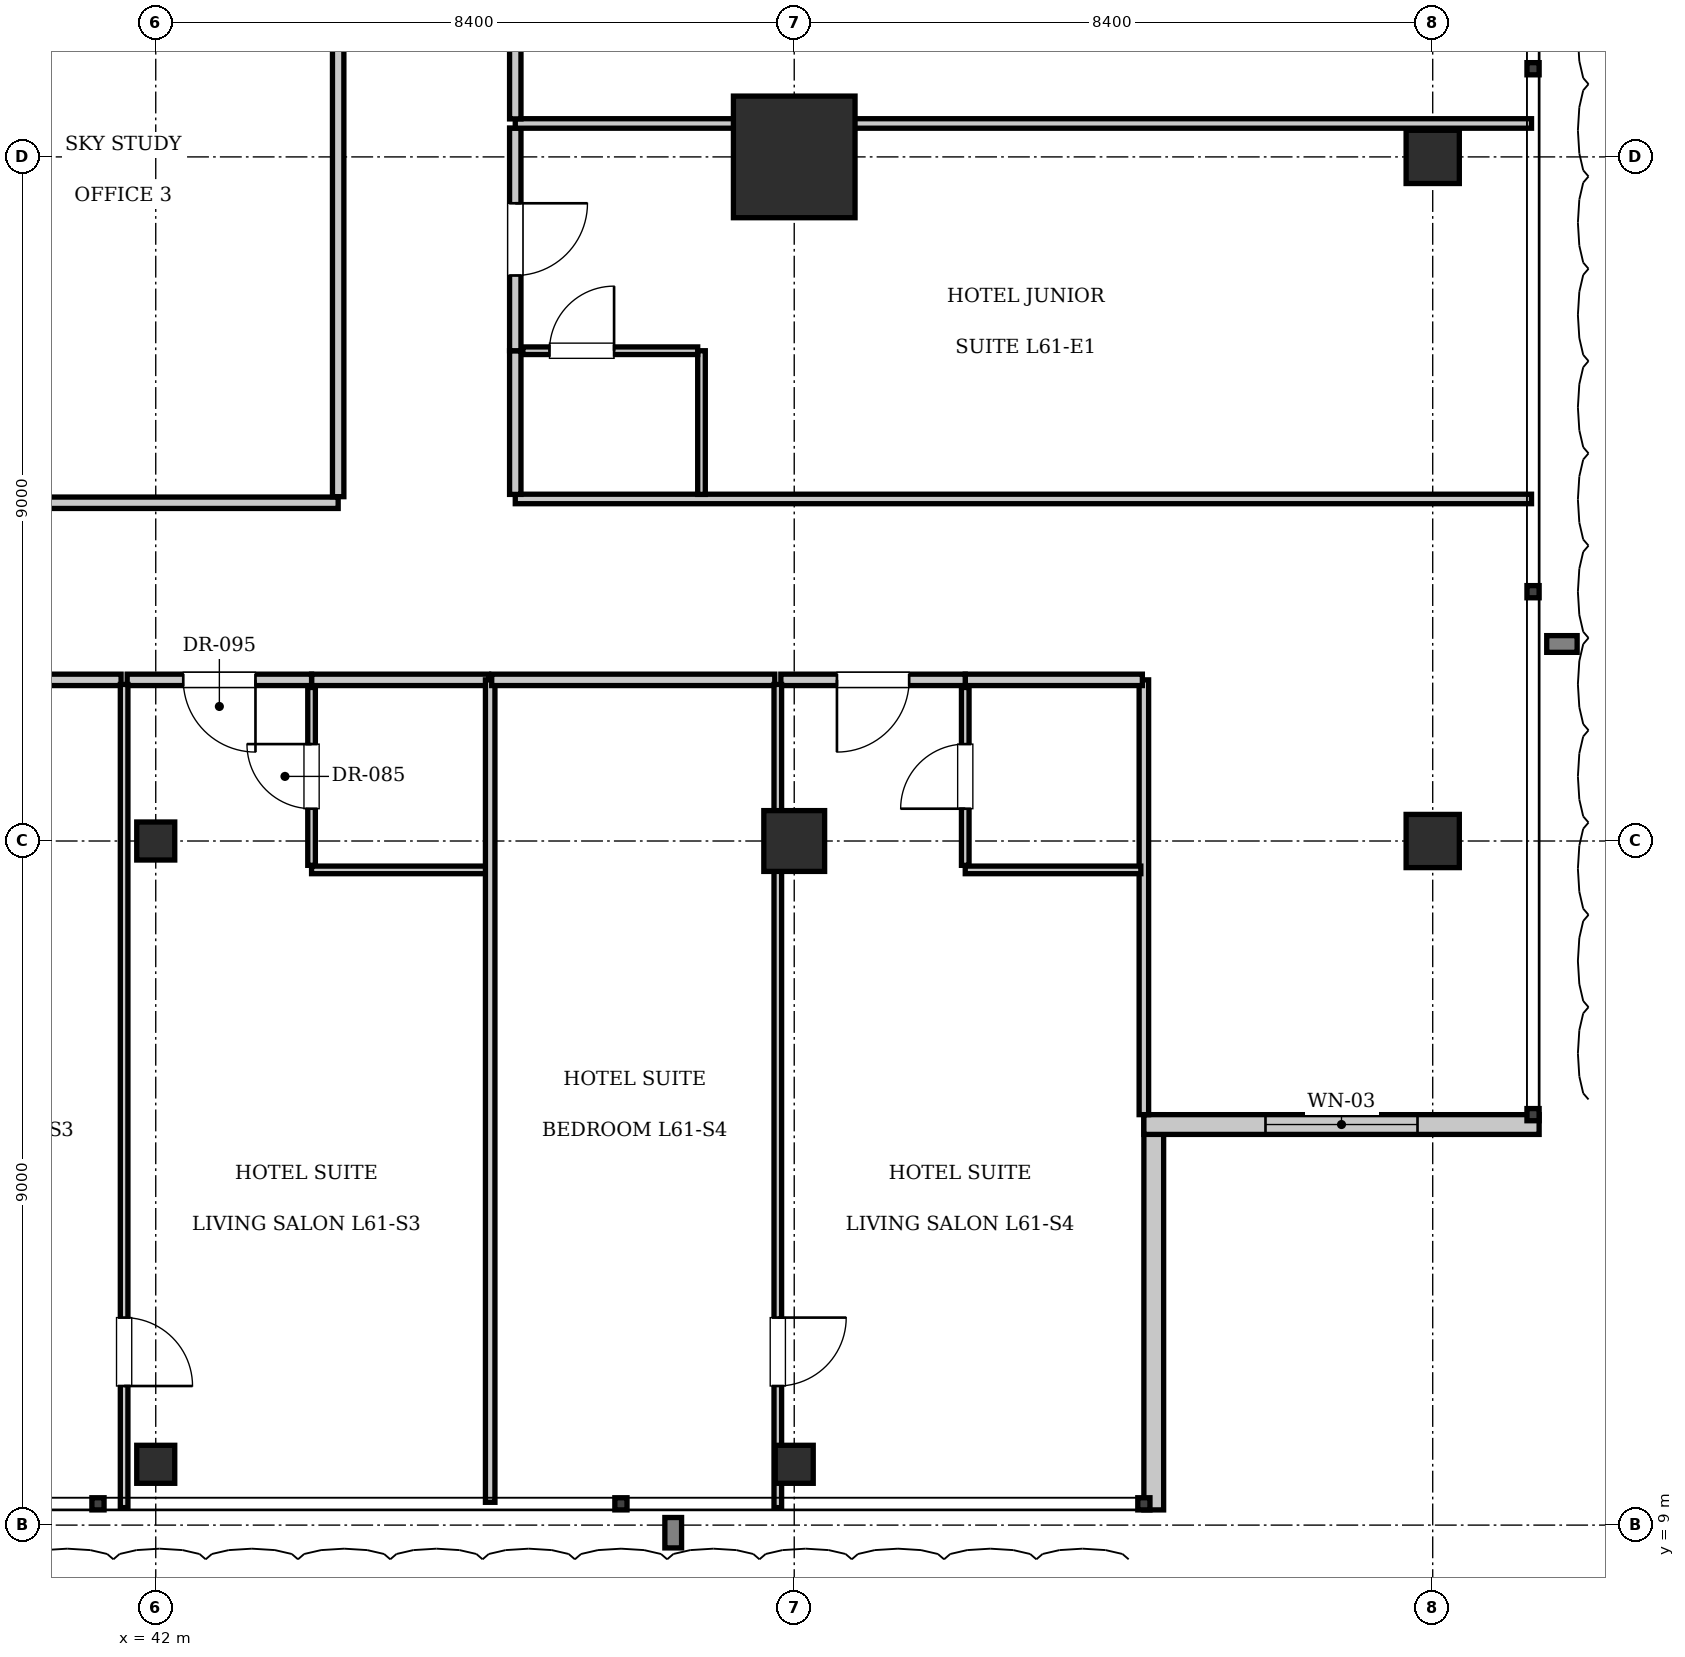
"""IFC4 building model, lengths in metres.
Left out: names, types, materials, properties, quantities, classifications, styles, units other than length and angle.
Written with IfcOpenShell. Run it as: python <this file> out.ifc"""

import sys

from ifc_helpers import new_model, si_unit, direction, frame, frame_2d, origin, origin_2d, place, context, subcontext, project, spatial, rectangle, i_section, extrude, element, fill, save


model = new_model("IFC4")
c1 = context("Model", 3, precision=1e-05, world=origin(), true_north=direction((0.0, 1.0)))
c2 = subcontext(c1, "Body", "Model", "MODEL_VIEW")
j1 = project(units=[si_unit("LENGTHUNIT", "METRE"), si_unit("PLANEANGLEUNIT", "RADIAN")], contexts=[c1])
p1 = place(None, origin())
s1 = spatial("IfcSite", under=j1, at=p1, CompositionType="ELEMENT")
p2 = place(p1, origin())
s2 = spatial("IfcBuilding", under=s1, at=p2, CompositionType="ELEMENT")
p3 = place(p2, frame((0.0, 0.0, 250.95)))
s3 = spatial("IfcBuildingStorey", under=s2, at=p3, CompositionType="ELEMENT", Elevation=250.95)
p4 = place(p3, frame((50.4, 27.0, 0.0), z_axis=(0.0, 0.0, 1.0), x_axis=(1.0, 0.0, 0.0)))
e1 = element("IfcColumn", 1, at=p4, inside=s3, PredefinedType="COLUMN", context=c2, shape_type="SweptSolid", body=[
    extrude(rectangle(XDim=1.6, YDim=1.6, at=origin_2d()), origin(), (0.0, 0.0, 1.0), 3.85),
])
p5 = place(p3, frame((50.4, 18.0, 0.0), z_axis=(0.0, 0.0, 1.0), x_axis=(1.0, 0.0, 0.0)))
e2 = element("IfcColumn", 2, at=p5, inside=s3, PredefinedType="COLUMN", context=c2, shape_type="SweptSolid", body=[
    extrude(rectangle(XDim=0.8, YDim=0.8, at=origin_2d()), origin(), (0.0, 0.0, 1.0), 3.85),
])
p6 = place(p3, frame((42.0, 18.0, 0.0), z_axis=(0.0, 0.0, 1.0), x_axis=(1.0, 0.0, 0.0)))
e3 = element("IfcColumn", 3, at=p6, inside=s3, PredefinedType="COLUMN", context=c2, shape_type="SweptSolid", body=[
    extrude(i_section(OverallWidth=0.5, OverallDepth=0.5, WebThickness=0.022, FlangeThickness=0.032, at=origin_2d()), origin(), (0.0, 0.0, 1.0), 3.85),
])
for number, where, z_axis, x_axis in (
    (4, (58.8, 18.0, 0.0), (0.0, 0.0, 1.0), (1.0, 0.0, 0.0)),
    (5, (58.8, 27.0, 0.0), (0.0, 0.0, 1.0), (1.0, 0.0, 0.0)),
):
    element("IfcColumn", number, at=place(p3, frame(where, z_axis=z_axis, x_axis=x_axis)), inside=s3, PredefinedType="COLUMN", context=c2, shape_type="SweptSolid", body=[
        extrude(rectangle(XDim=0.7, YDim=0.7, at=origin_2d()), origin(), (0.0, 0.0, 1.0), 3.85),
    ])
for number, where, z_axis, x_axis in (
    (6, (42.0, 9.8, 0.0), (0.0, 0.0, 1.0), (1.0, 0.0, 0.0)),
    (7, (50.4, 9.8, 0.0), (0.0, 0.0, 1.0), (1.0, 0.0, 0.0)),
):
    element("IfcColumn", number, at=place(p3, frame(where, z_axis=z_axis, x_axis=x_axis)), inside=s3, PredefinedType="COLUMN", context=c2, shape_type="SweptSolid", body=[
        extrude(i_section(OverallWidth=0.5, OverallDepth=0.5, WebThickness=0.022, FlangeThickness=0.032, at=origin_2d()), origin(), (0.0, 0.0, 1.0), 3.85),
    ])
p7 = place(p3, frame((55.13, 14.4, 0.0), z_axis=(0.0, 0.0, 1.0), x_axis=(0.0, -1.0, 0.0)))
e8 = element("IfcWall", 8, at=p7, inside=s3, PredefinedType="SOLIDWALL", context=c2, shape_type="SweptSolid", body=[
    extrude(rectangle(XDim=5.2, YDim=0.26, at=frame_2d((2.6, 0.0))), origin(), (0.0, 0.0, 1.0), 3.61),
])
p8 = place(p3, frame((60.2, 14.27, 0.0), z_axis=(0.0, 0.0, 1.0), x_axis=(-1.0, 0.0, 0.0)))
e9 = element("IfcWall", 9, at=p8, inside=s3, PredefinedType="SOLIDWALL", context=c2, shape_type="SweptSolid", body=[
    extrude(rectangle(XDim=5.2, YDim=0.26, at=frame_2d((2.6, 0.0))), origin(), (0.0, 0.0, 1.0), 3.61),
])
p9 = place(p8, frame((1.6, 0.0, 0.9)))
e10 = element("IfcOpeningElement", 10, at=p9, cuts=e9, PredefinedType="OPENING", context=c2, shape_type="SweptSolid", body=[
    extrude(rectangle(XDim=2.0, YDim=2.2, at=frame_2d((1.0, 1.1))), frame((0.0, 0.14, 0.0), z_axis=(0.0, -1.0, 0.0), x_axis=(1.0, 0.0, 0.0)), (0.0, 0.0, 1.0), 0.28),
])
p10 = place(p3, frame((31.25, 22.45, 0.0), z_axis=(0.0, 0.0, 1.0), x_axis=(1.0, 0.0, 0.0)))
e11 = element("IfcWall", 11, at=p10, inside=s3, PredefinedType="PARTITIONING", context=c2, shape_type="SweptSolid", body=[
    extrude(rectangle(XDim=13.15, YDim=0.15, at=frame_2d((6.575, 0.0))), origin(), (0.0, 0.0, 1.0), 3.61),
])
p11 = place(p3, frame((44.4, 22.53, 0.0), z_axis=(0.0, 0.0, 1.0), x_axis=(0.0, 1.0, 0.0)))
e12 = element("IfcWall", 12, at=p11, inside=s3, PredefinedType="PARTITIONING", context=c2, shape_type="SweptSolid", body=[
    extrude(rectangle(XDim=8.89, YDim=0.15, at=frame_2d((4.445, 0.0))), origin(), (0.0, 0.0, 1.0), 3.61),
])
p12 = place(p3, frame((55.0, 14.4, 0.0), z_axis=(0.0, 0.0, 1.0), x_axis=(0.0, 1.0, 0.0)))
e13 = element("IfcWall", 13, at=p12, inside=s3, PredefinedType="PARTITIONING", context=c2, shape_type="SweptSolid", body=[
    extrude(rectangle(XDim=5.72, YDim=0.125, at=frame_2d((2.86, 0.0))), origin(), (0.0, 0.0, 1.0), 3.61),
])
p13 = place(p3, frame((44.05, 20.12, 0.0), z_axis=(0.0, 0.0, 1.0), x_axis=(1.0, 0.0, 0.0)))
e14 = element("IfcWall", 14, at=p13, inside=s3, PredefinedType="PARTITIONING", context=c2, shape_type="SweptSolid", body=[
    extrude(rectangle(XDim=2.33, YDim=0.15, at=frame_2d((1.165, 0.0))), origin(), (0.0, 0.0, 1.0), 3.61),
])
p14 = place(p3, frame((44.05, 17.62, 0.0), z_axis=(0.0, 0.0, 1.0), x_axis=(1.0, 0.0, 0.0)))
e15 = element("IfcWall", 15, at=p14, inside=s3, PredefinedType="PARTITIONING", context=c2, shape_type="SweptSolid", body=[
    extrude(rectangle(XDim=2.31, YDim=0.1, at=frame_2d((1.155, 0.0))), origin(), (0.0, 0.0, 1.0), 3.61),
])
p15 = place(p3, frame((44.05, 17.68, 0.0), z_axis=(0.0, 0.0, 1.0), x_axis=(0.0, 1.0, 0.0)))
e16 = element("IfcWall", 16, at=p15, inside=s3, PredefinedType="PARTITIONING", context=c2, shape_type="SweptSolid", body=[
    extrude(rectangle(XDim=2.34, YDim=0.1, at=frame_2d((1.17, 0.0))), origin(), (0.0, 0.0, 1.0), 3.61),
])
p16 = place(p15, frame((0.745, 0.0, 0.0)))
e17 = element("IfcOpeningElement", 17, at=p16, cuts=e16, PredefinedType="OPENING", context=c2, shape_type="SweptSolid", body=[
    extrude(rectangle(XDim=0.85, YDim=2.1, at=frame_2d((0.425, 1.05))), frame((0.0, 0.06, 0.0), z_axis=(0.0, -1.0, 0.0), x_axis=(1.0, 0.0, 0.0)), (0.0, 0.0, 1.0), 0.12),
])
p17 = place(p3, frame((37.82, 20.12, 0.0), z_axis=(0.0, 0.0, 1.0), x_axis=(1.0, 0.0, 0.0)))
e18 = element("IfcWall", 18, at=p17, inside=s3, PredefinedType="PARTITIONING", context=c2, shape_type="SweptSolid", body=[
    extrude(rectangle(XDim=3.724, YDim=0.15, at=frame_2d((1.862, 0.0))), origin(), (0.0, 0.0, 1.0), 3.61),
])
p18 = place(p3, frame((41.624, 20.12, 0.0), z_axis=(0.0, 0.0, 1.0), x_axis=(1.0, 0.0, 0.0)))
e19 = element("IfcWall", 19, at=p18, inside=s3, PredefinedType="PARTITIONING", context=c2, shape_type="SweptSolid", body=[
    extrude(rectangle(XDim=2.426, YDim=0.15, at=frame_2d((1.213, 0.0))), origin(), (0.0, 0.0, 1.0), 3.61),
])
p19 = place(p18, frame((0.738, 0.0, 0.0)))
e20 = element("IfcOpeningElement", 20, at=p19, cuts=e19, PredefinedType="OPENING", context=c2, shape_type="SweptSolid", body=[
    extrude(rectangle(XDim=0.95, YDim=2.15, at=frame_2d((0.475, 1.075))), frame((0.0, 0.085, 0.0), z_axis=(0.0, -1.0, 0.0), x_axis=(1.0, 0.0, 0.0)), (0.0, 0.0, 1.0), 0.17),
])
p20 = place(p3, frame((41.584, 9.23, 0.0), z_axis=(0.0, 0.0, 1.0), x_axis=(0.0, 1.0, 0.0)))
e21 = element("IfcWall", 21, at=p20, inside=s3, PredefinedType="PARTITIONING", context=c2, shape_type="SweptSolid", body=[
    extrude(rectangle(XDim=10.83, YDim=0.1, at=frame_2d((5.415, 0.0))), origin(), (0.0, 0.0, 1.0), 3.61),
])
p21 = place(p20, frame((1.6, 0.0, 0.0)))
e22 = element("IfcOpeningElement", 22, at=p21, cuts=e21, PredefinedType="OPENING", context=c2, shape_type="SweptSolid", body=[
    extrude(rectangle(XDim=0.9, YDim=2.1, at=frame_2d((0.45, 1.05))), frame((0.0, 0.06, 0.0), z_axis=(0.0, -1.0, 0.0), x_axis=(1.0, 0.0, 0.0)), (0.0, 0.0, 1.0), 0.12),
])
p22 = place(p3, frame((46.4, 9.3, 0.0), z_axis=(0.0, 0.0, 1.0), x_axis=(0.0, 1.0, 0.0)))
e23 = element("IfcWall", 23, at=p22, inside=s3, PredefinedType="PARTITIONING", context=c2, shape_type="SweptSolid", body=[
    extrude(rectangle(XDim=10.82, YDim=0.125, at=frame_2d((5.41, 0.0))), origin(), (0.0, 0.0, 1.0), 3.61),
])
p23 = place(p3, frame((52.65, 20.12, 0.0), z_axis=(0.0, 0.0, 1.0), x_axis=(1.0, 0.0, 0.0)))
e24 = element("IfcWall", 24, at=p23, inside=s3, PredefinedType="PARTITIONING", context=c2, shape_type="SweptSolid", body=[
    extrude(rectangle(XDim=2.33, YDim=0.15, at=frame_2d((1.165, 0.0))), origin(), (0.0, 0.0, 1.0), 3.61),
])
p24 = place(p3, frame((52.65, 17.62, 0.0), z_axis=(0.0, 0.0, 1.0), x_axis=(1.0, 0.0, 0.0)))
e25 = element("IfcWall", 25, at=p24, inside=s3, PredefinedType="PARTITIONING", context=c2, shape_type="SweptSolid", body=[
    extrude(rectangle(XDim=2.31, YDim=0.1, at=frame_2d((1.155, 0.0))), origin(), (0.0, 0.0, 1.0), 3.61),
])
p25 = place(p3, frame((52.65, 17.68, 0.0), z_axis=(0.0, 0.0, 1.0), x_axis=(0.0, 1.0, 0.0)))
e26 = element("IfcWall", 26, at=p25, inside=s3, PredefinedType="PARTITIONING", context=c2, shape_type="SweptSolid", body=[
    extrude(rectangle(XDim=2.34, YDim=0.1, at=frame_2d((1.17, 0.0))), origin(), (0.0, 0.0, 1.0), 3.61),
])
p26 = place(p25, frame((0.745, 0.0, 0.0)))
e27 = element("IfcOpeningElement", 27, at=p26, cuts=e26, PredefinedType="OPENING", context=c2, shape_type="SweptSolid", body=[
    extrude(rectangle(XDim=0.85, YDim=2.1, at=frame_2d((0.425, 1.05))), frame((0.0, 0.06, 0.0), z_axis=(0.0, -1.0, 0.0), x_axis=(1.0, 0.0, 0.0)), (0.0, 0.0, 1.0), 0.12),
])
p27 = place(p3, frame((46.42, 20.12, 0.0), z_axis=(0.0, 0.0, 1.0), x_axis=(1.0, 0.0, 0.0)))
e28 = element("IfcWall", 28, at=p27, inside=s3, PredefinedType="PARTITIONING", context=c2, shape_type="SweptSolid", body=[
    extrude(rectangle(XDim=3.724, YDim=0.15, at=frame_2d((1.862, 0.0))), origin(), (0.0, 0.0, 1.0), 3.61),
])
p28 = place(p3, frame((50.224, 20.12, 0.0), z_axis=(0.0, 0.0, 1.0), x_axis=(1.0, 0.0, 0.0)))
e29 = element("IfcWall", 29, at=p28, inside=s3, PredefinedType="PARTITIONING", context=c2, shape_type="SweptSolid", body=[
    extrude(rectangle(XDim=2.426, YDim=0.15, at=frame_2d((1.213, 0.0))), origin(), (0.0, 0.0, 1.0), 3.61),
])
p29 = place(p28, frame((0.738, 0.0, 0.0)))
e30 = element("IfcOpeningElement", 30, at=p29, cuts=e29, PredefinedType="OPENING", context=c2, shape_type="SweptSolid", body=[
    extrude(rectangle(XDim=0.95, YDim=2.15, at=frame_2d((0.475, 1.075))), frame((0.0, 0.085, 0.0), z_axis=(0.0, -1.0, 0.0), x_axis=(1.0, 0.0, 0.0)), (0.0, 0.0, 1.0), 0.17),
])
p30 = place(p3, frame((50.184, 9.23, 0.0), z_axis=(0.0, 0.0, 1.0), x_axis=(0.0, 1.0, 0.0)))
e31 = element("IfcWall", 31, at=p30, inside=s3, PredefinedType="PARTITIONING", context=c2, shape_type="SweptSolid", body=[
    extrude(rectangle(XDim=10.83, YDim=0.1, at=frame_2d((5.415, 0.0))), origin(), (0.0, 0.0, 1.0), 3.61),
])
p31 = place(p30, frame((1.6, 0.0, 0.0)))
e32 = element("IfcOpeningElement", 32, at=p31, cuts=e31, PredefinedType="OPENING", context=c2, shape_type="SweptSolid", body=[
    extrude(rectangle(XDim=0.9, YDim=2.1, at=frame_2d((0.45, 1.05))), frame((0.0, 0.06, 0.0), z_axis=(0.0, -1.0, 0.0), x_axis=(1.0, 0.0, 0.0)), (0.0, 0.0, 1.0), 0.12),
])
p32 = place(p3, frame((46.73, 22.5, 0.0), z_axis=(0.0, 0.0, 1.0), x_axis=(1.0, 0.0, 0.0)))
e33 = element("IfcWall", 33, at=p32, inside=s3, PredefinedType="PARTITIONING", context=c2, shape_type="SweptSolid", body=[
    extrude(rectangle(XDim=13.37, YDim=0.125, at=frame_2d((6.685, 0.0))), origin(), (0.0, 0.0, 1.0), 3.61),
])
p33 = place(p3, frame((46.73, 22.56, 0.0), z_axis=(0.0, 0.0, 1.0), x_axis=(0.0, 1.0, 0.0)))
e34 = element("IfcWall", 34, at=p33, inside=s3, PredefinedType="PARTITIONING", context=c2, shape_type="SweptSolid", body=[
    extrude(rectangle(XDim=1.89, YDim=0.15, at=frame_2d((0.945, 0.0))), origin(), (0.0, 0.0, 1.0), 3.61),
])
p34 = place(p3, frame((46.73, 24.45, 0.0), z_axis=(0.0, 0.0, 1.0), x_axis=(0.0, 1.0, 0.0)))
e35 = element("IfcWall", 35, at=p34, inside=s3, PredefinedType="PARTITIONING", context=c2, shape_type="SweptSolid", body=[
    extrude(rectangle(XDim=2.93, YDim=0.15, at=frame_2d((1.465, 0.0))), origin(), (0.0, 0.0, 1.0), 3.61),
])
p35 = place(p34, frame((0.99, 0.0, 0.0)))
e36 = element("IfcOpeningElement", 36, at=p35, cuts=e35, PredefinedType="OPENING", context=c2, shape_type="SweptSolid", body=[
    extrude(rectangle(XDim=0.95, YDim=2.15, at=frame_2d((0.475, 1.075))), frame((0.0, 0.085, 0.0), z_axis=(0.0, -1.0, 0.0), x_axis=(1.0, 0.0, 0.0)), (0.0, 0.0, 1.0), 0.17),
])
p36 = place(p3, frame((49.18, 22.56, 0.0), z_axis=(0.0, 0.0, 1.0), x_axis=(0.0, 1.0, 0.0)))
e37 = element("IfcWall", 37, at=p36, inside=s3, PredefinedType="PARTITIONING", context=c2, shape_type="SweptSolid", body=[
    extrude(rectangle(XDim=1.89, YDim=0.1, at=frame_2d((0.945, 0.0))), origin(), (0.0, 0.0, 1.0), 3.61),
])
p37 = place(p3, frame((46.83, 24.45, 0.0), z_axis=(0.0, 0.0, 1.0), x_axis=(1.0, 0.0, 0.0)))
e38 = element("IfcWall", 38, at=p37, inside=s3, PredefinedType="PARTITIONING", context=c2, shape_type="SweptSolid", body=[
    extrude(rectangle(XDim=2.3, YDim=0.1, at=frame_2d((1.15, 0.0))), origin(), (0.0, 0.0, 1.0), 3.61),
])
p38 = place(p37, frame((0.35, 0.0, 0.0)))
e39 = element("IfcOpeningElement", 39, at=p38, cuts=e38, PredefinedType="OPENING", context=c2, shape_type="SweptSolid", body=[
    extrude(rectangle(XDim=0.85, YDim=2.1, at=frame_2d((0.425, 1.05))), frame((0.0, 0.06, 0.0), z_axis=(0.0, -1.0, 0.0), x_axis=(1.0, 0.0, 0.0)), (0.0, 0.0, 1.0), 0.12),
])
p39 = place(p3, frame((46.73, 27.44, 0.0), z_axis=(0.0, 0.0, 1.0), x_axis=(1.0, 0.0, 0.0)))
e40 = element("IfcWall", 40, at=p39, inside=s3, PredefinedType="PARTITIONING", context=c2, shape_type="SweptSolid", body=[
    extrude(rectangle(XDim=13.37, YDim=0.125, at=frame_2d((6.685, 0.0))), origin(), (0.0, 0.0, 1.0), 3.61),
])
p40 = place(p3, frame((46.73, 27.5, 0.0), z_axis=(0.0, 0.0, 1.0), x_axis=(0.0, 1.0, 0.0)))
e41 = element("IfcWall", 41, at=p40, inside=s3, PredefinedType="PARTITIONING", context=c2, shape_type="SweptSolid", body=[
    extrude(rectangle(XDim=2.93, YDim=0.15, at=frame_2d((1.465, 0.0))), origin(), (0.0, 0.0, 1.0), 3.61),
])
p41 = place(p40, frame((0.99, 0.0, 0.0)))
e42 = element("IfcOpeningElement", 42, at=p41, cuts=e41, PredefinedType="OPENING", context=c2, shape_type="SweptSolid", body=[
    extrude(rectangle(XDim=0.95, YDim=2.15, at=frame_2d((0.475, 1.075))), frame((0.0, 0.085, 0.0), z_axis=(0.0, -1.0, 0.0), x_axis=(1.0, 0.0, 0.0)), (0.0, 0.0, 1.0), 0.17),
])
p42 = place(p9, origin())
e43 = element("IfcWindow", 43, at=p42, inside=s3, PartitioningType="SINGLE_PANEL", PredefinedType="WINDOW", context=c2, shape_type="SweptSolid", body=[
    extrude(rectangle(XDim=2.0, YDim=2.2, at=frame_2d((1.0, 1.1))), frame((0.0, 0.03, 0.0), z_axis=(0.0, -1.0, 0.0), x_axis=(1.0, 0.0, 0.0)), (0.0, 0.0, 1.0), 0.06),
])
fill(e10, e43)
p43 = place(p16, origin())
e44 = element("IfcDoor", 44, at=p43, inside=s3, OperationType="SINGLE_SWING_RIGHT", PredefinedType="DOOR", context=c2, shape_type="SweptSolid", body=[
    extrude(rectangle(XDim=0.85, YDim=2.1, at=frame_2d((0.425, 1.05))), frame((0.0, 0.025, 0.0), z_axis=(0.0, -1.0, 0.0), x_axis=(1.0, 0.0, 0.0)), (0.0, 0.0, 1.0), 0.05),
])
fill(e17, e44)
p44 = place(p19, frame((0.95, 0.0, 0.0), z_axis=(0.0, 0.0, 1.0), x_axis=(-1.0, 0.0, 0.0)))
e45 = element("IfcDoor", 45, at=p44, inside=s3, OperationType="SINGLE_SWING_LEFT", PredefinedType="DOOR", context=c2, shape_type="SweptSolid", body=[
    extrude(rectangle(XDim=0.95, YDim=2.15, at=frame_2d((0.475, 1.075))), frame((0.0, 0.025, 0.0), z_axis=(0.0, -1.0, 0.0), x_axis=(1.0, 0.0, 0.0)), (0.0, 0.0, 1.0), 0.05),
])
fill(e20, e45)
p45 = place(p21, frame((0.9, 0.0, 0.0), z_axis=(0.0, 0.0, 1.0), x_axis=(-1.0, 0.0, 0.0)))
e46 = element("IfcDoor", 46, at=p45, inside=s3, OperationType="SINGLE_SWING_RIGHT", PredefinedType="DOOR", context=c2, shape_type="SweptSolid", body=[
    extrude(rectangle(XDim=0.9, YDim=2.1, at=frame_2d((0.45, 1.05))), frame((0.0, 0.025, 0.0), z_axis=(0.0, -1.0, 0.0), x_axis=(1.0, 0.0, 0.0)), (0.0, 0.0, 1.0), 0.05),
])
fill(e22, e46)
p46 = place(p26, origin())
e47 = element("IfcDoor", 47, at=p46, inside=s3, OperationType="SINGLE_SWING_LEFT", PredefinedType="DOOR", context=c2, shape_type="SweptSolid", body=[
    extrude(rectangle(XDim=0.85, YDim=2.1, at=frame_2d((0.425, 1.05))), frame((0.0, 0.025, 0.0), z_axis=(0.0, -1.0, 0.0), x_axis=(1.0, 0.0, 0.0)), (0.0, 0.0, 1.0), 0.05),
])
fill(e27, e47)
p47 = place(p29, frame((0.95, 0.0, 0.0), z_axis=(0.0, 0.0, 1.0), x_axis=(-1.0, 0.0, 0.0)))
e48 = element("IfcDoor", 48, at=p47, inside=s3, OperationType="SINGLE_SWING_RIGHT", PredefinedType="DOOR", context=c2, shape_type="SweptSolid", body=[
    extrude(rectangle(XDim=0.95, YDim=2.15, at=frame_2d((0.475, 1.075))), frame((0.0, 0.025, 0.0), z_axis=(0.0, -1.0, 0.0), x_axis=(1.0, 0.0, 0.0)), (0.0, 0.0, 1.0), 0.05),
])
fill(e30, e48)
p48 = place(p31, frame((0.9, 0.0, 0.0), z_axis=(0.0, 0.0, 1.0), x_axis=(-1.0, 0.0, 0.0)))
e49 = element("IfcDoor", 49, at=p48, inside=s3, OperationType="SINGLE_SWING_LEFT", PredefinedType="DOOR", context=c2, shape_type="SweptSolid", body=[
    extrude(rectangle(XDim=0.9, YDim=2.1, at=frame_2d((0.45, 1.05))), frame((0.0, 0.025, 0.0), z_axis=(0.0, -1.0, 0.0), x_axis=(1.0, 0.0, 0.0)), (0.0, 0.0, 1.0), 0.05),
])
fill(e32, e49)
p49 = place(p38, origin())
e50 = element("IfcDoor", 50, at=p49, inside=s3, OperationType="SINGLE_SWING_RIGHT", PredefinedType="DOOR", context=c2, shape_type="SweptSolid", body=[
    extrude(rectangle(XDim=0.85, YDim=2.1, at=frame_2d((0.425, 1.05))), frame((0.0, 0.025, 0.0), z_axis=(0.0, -1.0, 0.0), x_axis=(1.0, 0.0, 0.0)), (0.0, 0.0, 1.0), 0.05),
])
fill(e39, e50)
p50 = place(p35, frame((0.95, 0.0, 0.0), z_axis=(0.0, 0.0, 1.0), x_axis=(-1.0, 0.0, 0.0)))
e51 = element("IfcDoor", 51, at=p50, inside=s3, OperationType="SINGLE_SWING_LEFT", PredefinedType="DOOR", context=c2, shape_type="SweptSolid", body=[
    extrude(rectangle(XDim=0.95, YDim=2.15, at=frame_2d((0.475, 1.075))), frame((0.0, 0.025, 0.0), z_axis=(0.0, -1.0, 0.0), x_axis=(1.0, 0.0, 0.0)), (0.0, 0.0, 1.0), 0.05),
])
fill(e36, e51)
save(model, sys.argv[1])
